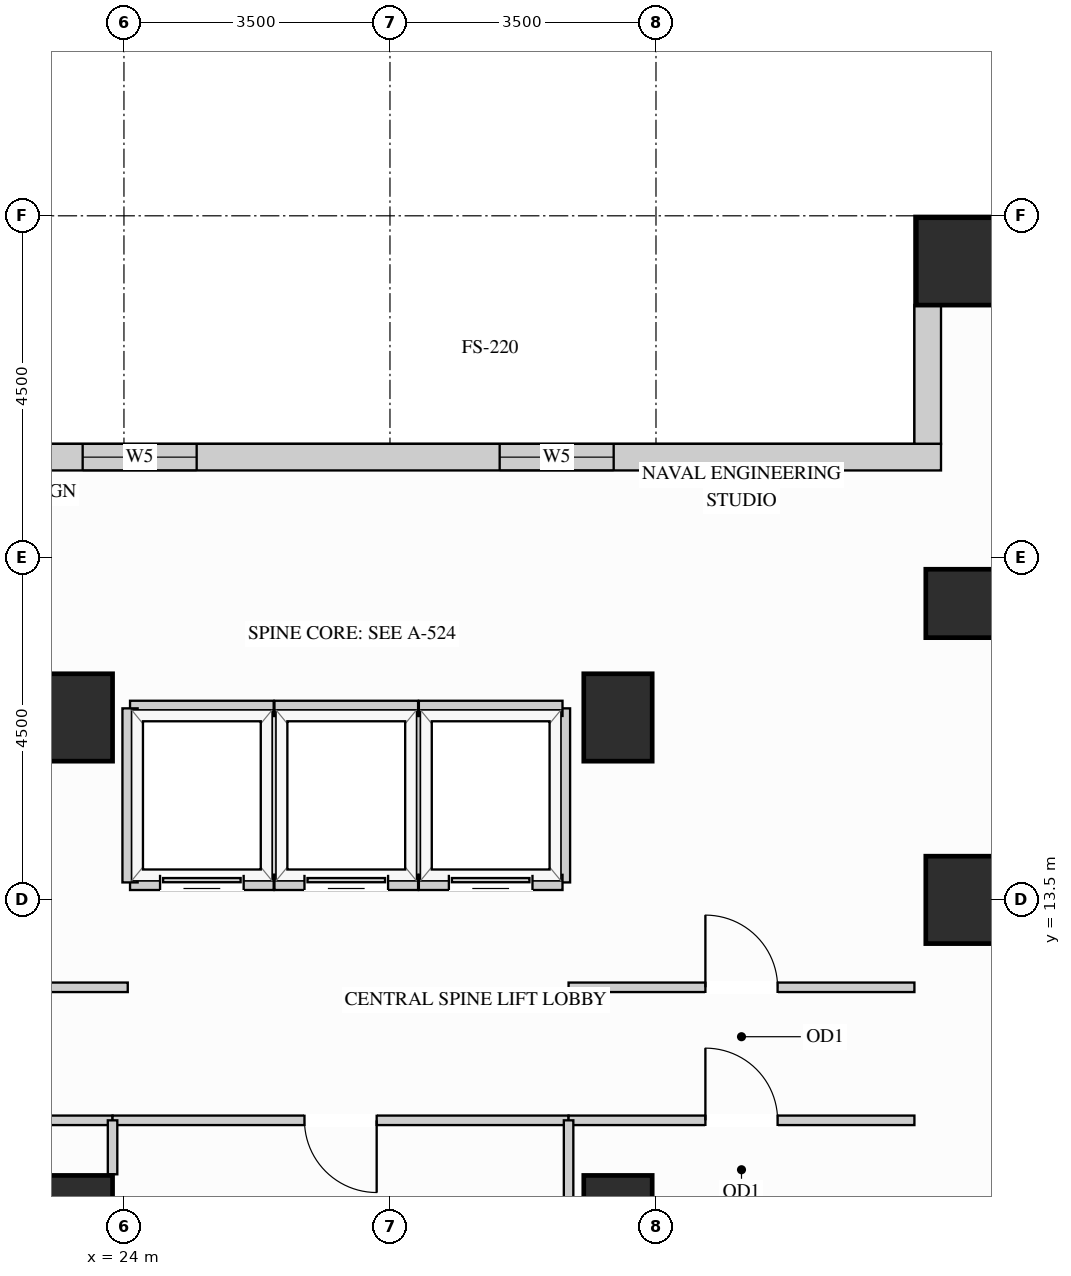
"""IFC4 building model, lengths in metres.
Left out: names, types, materials, properties, quantities, classifications, styles, units other than length and angle.
Written with IfcOpenShell. Run it as: python <this file> out.ifc"""

import sys

from ifc_helpers import new_model, si_unit, direction, frame, frame_2d, origin, origin_2d, place, context, subcontext, project, spatial, rectangle, extrude, source, transform, mapped, element, fill, save


model = new_model("IFC4")
c1 = context("Model", 3, precision=1e-05, world=origin(), true_north=direction((0.0, 1.0)))
c2 = subcontext(c1, "Body", "Model", "MODEL_VIEW")
j1 = project(units=[si_unit("LENGTHUNIT", "METRE"), si_unit("PLANEANGLEUNIT", "RADIAN")], contexts=[c1])
p1 = place(None, origin())
s1 = spatial("IfcSite", under=j1, at=p1, CompositionType="ELEMENT")
p2 = place(p1, origin())
s2 = spatial("IfcBuilding", under=s1, at=p2, CompositionType="ELEMENT")
p3 = place(p2, frame((0.0, 0.0, 135.0)))
s3 = spatial("IfcBuildingStorey", under=s2, at=p3, CompositionType="ELEMENT", Elevation=135.0)
m1 = source(origin(), c2, "Body", "SweptSolid", [
    extrude(rectangle(XDim=0.9, YDim=0.9, at=origin_2d()), origin(), (0.0, 0.0, 1.0), 3.32),
])
p4 = place(p3, frame((35.0, 17.4, 0.0), z_axis=(0.0, 0.0, 1.0), x_axis=(1.0, 0.0, 0.0)))
e1 = element("IfcColumn", 1, at=p4, inside=s3, PredefinedType="COLUMN", context=c2, shape_type="MappedRepresentation", body=[
    mapped(m1, transform((0.0, 0.0, 0.0), x_axis=(1.0, 0.0, 0.0), y_axis=(0.0, 1.0, 0.0), z_axis=(0.0, 0.0, 1.0))),
])
m2 = source(origin(), c2, "Body", "SweptSolid", [
    extrude(rectangle(XDim=0.9, YDim=1.15, at=origin_2d()), origin(), (0.0, 0.0, 1.0), 3.32),
])
for number, where, z_axis, x_axis in (
    (2, (35.0, 13.5, 0.0), (0.0, 0.0, 1.0), (1.0, 0.0, 0.0)),
    (3, (23.4, 15.9, 0.0), (0.0, 0.0, 1.0), (1.0, 0.0, 0.0)),
    (4, (23.4, 9.3, 0.0), (0.0, 0.0, 1.0), (1.0, 0.0, 0.0)),
    (5, (30.5, 15.9, 0.0), (0.0, 0.0, 1.0), (1.0, 0.0, 0.0)),
    (6, (30.5, 9.3, 0.0), (0.0, 0.0, 1.0), (1.0, 0.0, 0.0)),
):
    element("IfcColumn", number, at=place(p3, frame(where, z_axis=z_axis, x_axis=x_axis)), inside=s3, PredefinedType="COLUMN", context=c2, shape_type="MappedRepresentation", body=[
        mapped(m2, transform((0.0, 0.0, 0.0), x_axis=(1.0, 0.0, 0.0), y_axis=(0.0, 1.0, 0.0), z_axis=(0.0, 0.0, 1.0))),
    ])
m3 = source(origin(), c2, "Body", "SweptSolid", [
    extrude(rectangle(XDim=1.15, YDim=1.15, at=origin_2d()), origin(), (0.0, 0.0, 1.0), 3.32),
])
p5 = place(p3, frame((35.0, 21.9, 0.0), z_axis=(0.0, 0.0, 1.0), x_axis=(1.0, 0.0, 0.0)))
e7 = element("IfcColumn", 7, at=p5, inside=s3, PredefinedType="COLUMN", context=c2, shape_type="MappedRepresentation", body=[
    mapped(m3, transform((0.0, 0.0, 0.0), x_axis=(1.0, 0.0, 0.0), y_axis=(0.0, 1.0, 0.0), z_axis=(0.0, 0.0, 1.0))),
])
m4 = source(origin(), c2, "Body", "SweptSolid", [
    extrude(rectangle(XDim=1.829, YDim=0.35, at=frame_2d((0.915, 0.0))), origin(), (0.0, 0.0, 1.0), 3.305),
])
p6 = place(p3, frame((34.575, 21.327, 0.0), z_axis=(0.0, 0.0, 1.0), x_axis=(0.0, -1.0, 0.0)))
e8 = element("IfcWall", 8, at=p6, inside=s3, PredefinedType="SOLIDWALL", context=c2, shape_type="MappedRepresentation", body=[
    mapped(m4, transform((0.0, 0.0, 0.0), x_axis=(1.0, 0.0, 0.0), y_axis=(0.0, 1.0, 0.0), z_axis=(0.0, 0.0, 1.0))),
])
p7 = place(p3, frame((34.75, 19.325, 0.0), z_axis=(0.0, 0.0, 1.0), x_axis=(-1.0, 0.0, 0.0)))
e9 = element("IfcWall", 9, at=p7, inside=s3, PredefinedType="SOLIDWALL", context=c2, shape_type="SweptSolid", body=[
    extrude(rectangle(XDim=15.6, YDim=0.35, at=frame_2d((7.8, 0.0))), origin(), (0.0, 0.0, 1.0), 3.305),
])
p8 = place(p7, frame((4.307, 0.0, 0.78)))
e10 = element("IfcOpeningElement", 10, at=p8, cuts=e9, PredefinedType="OPENING", context=c2, shape_type="SweptSolid", body=[
    extrude(rectangle(XDim=1.5, YDim=2.0, at=frame_2d((0.75, 1.0))), frame((0.0, 0.185, 0.0), z_axis=(0.0, -1.0, 0.0), x_axis=(1.0, 0.0, 0.0)), (0.0, 0.0, 1.0), 0.37),
])
p9 = place(p7, frame((9.793, 0.0, 0.78)))
e11 = element("IfcOpeningElement", 11, at=p9, cuts=e9, PredefinedType="OPENING", context=c2, shape_type="SweptSolid", body=[
    extrude(rectangle(XDim=1.5, YDim=2.0, at=frame_2d((0.75, 1.0))), frame((0.0, 0.185, 0.0), z_axis=(0.0, -1.0, 0.0), x_axis=(1.0, 0.0, 0.0)), (0.0, 0.0, 1.0), 0.37),
])
p10 = place(p3, frame((29.85, 12.35, 0.0), z_axis=(0.0, 0.0, 1.0), x_axis=(1.0, 0.0, 0.0)))
e12 = element("IfcWall", 12, at=p10, inside=s3, PredefinedType="PARTITIONING", context=c2, shape_type="SweptSolid", body=[
    extrude(rectangle(XDim=4.55, YDim=0.125, at=frame_2d((2.275, 0.0))), origin(), (0.0, 0.0, 1.0), 3.305),
])
p11 = place(p10, frame((1.8, 0.0, 0.0)))
e13 = element("IfcOpeningElement", 13, at=p11, cuts=e12, PredefinedType="OPENING", context=c2, shape_type="SweptSolid", body=[
    extrude(rectangle(XDim=0.95, YDim=2.15, at=frame_2d((0.475, 1.075))), frame((0.0, 0.073, 0.0), z_axis=(0.0, -1.0, 0.0), x_axis=(1.0, 0.0, 0.0)), (0.0, 0.0, 1.0), 0.145),
])
p12 = place(p3, frame((19.5, 12.35, 0.0), z_axis=(0.0, 0.0, 1.0), x_axis=(1.0, 0.0, 0.0)))
e14 = element("IfcWall", 14, at=p12, inside=s3, PredefinedType="PARTITIONING", context=c2, shape_type="SweptSolid", body=[
    extrude(rectangle(XDim=4.55, YDim=0.125, at=frame_2d((2.275, 0.0))), origin(), (0.0, 0.0, 1.0), 3.305),
])
p13 = place(p12, frame((1.8, 0.0, 0.0)))
e15 = element("IfcOpeningElement", 15, at=p13, cuts=e14, PredefinedType="OPENING", context=c2, shape_type="SweptSolid", body=[
    extrude(rectangle(XDim=0.95, YDim=2.15, at=frame_2d((0.475, 1.075))), frame((0.0, 0.073, 0.0), z_axis=(0.0, -1.0, 0.0), x_axis=(1.0, 0.0, 0.0)), (0.0, 0.0, 1.0), 0.145),
])
p14 = place(p3, frame((19.5, 10.6, 0.0), z_axis=(0.0, 0.0, 1.0), x_axis=(1.0, 0.0, 0.0)))
e16 = element("IfcWall", 16, at=p14, inside=s3, PredefinedType="PARTITIONING", context=c2, shape_type="SweptSolid", body=[
    extrude(rectangle(XDim=4.35, YDim=0.125, at=frame_2d((2.175, 0.0))), origin(), (0.0, 0.0, 1.0), 3.305),
])
p15 = place(p14, frame((1.7, 0.0, 0.0)))
e17 = element("IfcOpeningElement", 17, at=p15, cuts=e16, PredefinedType="OPENING", context=c2, shape_type="SweptSolid", body=[
    extrude(rectangle(XDim=0.95, YDim=2.15, at=frame_2d((0.475, 1.075))), frame((0.0, 0.073, 0.0), z_axis=(0.0, -1.0, 0.0), x_axis=(1.0, 0.0, 0.0)), (0.0, 0.0, 1.0), 0.145),
])
p16 = place(p3, frame((23.85, 10.6, 0.0), z_axis=(0.0, 0.0, 1.0), x_axis=(1.0, 0.0, 0.0)))
e18 = element("IfcWall", 18, at=p16, inside=s3, PredefinedType="PARTITIONING", context=c2, shape_type="SweptSolid", body=[
    extrude(rectangle(XDim=6.0, YDim=0.125, at=frame_2d((3.0, 0.0))), origin(), (0.0, 0.0, 1.0), 3.305),
])
p17 = place(p16, frame((2.525, 0.0, 0.0)))
e19 = element("IfcOpeningElement", 19, at=p17, cuts=e18, PredefinedType="OPENING", context=c2, shape_type="SweptSolid", body=[
    extrude(rectangle(XDim=0.95, YDim=2.15, at=frame_2d((0.475, 1.075))), frame((0.0, 0.073, 0.0), z_axis=(0.0, -1.0, 0.0), x_axis=(1.0, 0.0, 0.0)), (0.0, 0.0, 1.0), 0.145),
])
p18 = place(p3, frame((29.85, 10.6, 0.0), z_axis=(0.0, 0.0, 1.0), x_axis=(1.0, 0.0, 0.0)))
e20 = element("IfcWall", 20, at=p18, inside=s3, PredefinedType="PARTITIONING", context=c2, shape_type="SweptSolid", body=[
    extrude(rectangle(XDim=4.55, YDim=0.125, at=frame_2d((2.275, 0.0))), origin(), (0.0, 0.0, 1.0), 3.305),
])
p19 = place(p18, frame((1.8, 0.0, 0.0)))
e21 = element("IfcOpeningElement", 21, at=p19, cuts=e20, PredefinedType="OPENING", context=c2, shape_type="SweptSolid", body=[
    extrude(rectangle(XDim=0.95, YDim=2.15, at=frame_2d((0.475, 1.075))), frame((0.0, 0.073, 0.0), z_axis=(0.0, -1.0, 0.0), x_axis=(1.0, 0.0, 0.0)), (0.0, 0.0, 1.0), 0.145),
])
m5 = source(origin(), c2, "Body", "SweptSolid", [
    extrude(rectangle(XDim=0.71, YDim=0.125, at=frame_2d((0.355, 0.0))), origin(), (0.0, 0.0, 1.0), 3.305),
])
p20 = place(p3, frame((23.85, 9.89, 0.0), z_axis=(0.0, 0.0, 1.0), x_axis=(0.0, 1.0, 0.0)))
e22 = element("IfcWall", 22, at=p20, inside=s3, PredefinedType="PARTITIONING", context=c2, shape_type="MappedRepresentation", body=[
    mapped(m5, transform((0.0, 0.0, 0.0), x_axis=(1.0, 0.0, 0.0), y_axis=(0.0, 1.0, 0.0), z_axis=(0.0, 0.0, 1.0))),
])
m6 = source(origin(), c2, "Body", "SweptSolid", [
    extrude(rectangle(XDim=1.748, YDim=0.125, at=frame_2d((0.874, 0.0))), origin(), (0.0, 0.0, 1.0), 3.305),
])
p21 = place(p3, frame((29.85, 8.852, 0.0), z_axis=(0.0, 0.0, 1.0), x_axis=(0.0, 1.0, 0.0)))
e23 = element("IfcWall", 23, at=p21, inside=s3, PredefinedType="PARTITIONING", context=c2, shape_type="MappedRepresentation", body=[
    mapped(m6, transform((0.0, 0.0, 0.0), x_axis=(1.0, 0.0, 0.0), y_axis=(0.0, 1.0, 0.0), z_axis=(0.0, 0.0, 1.0))),
])
m7 = source(origin(), c2, "Body", "SweptSolid", [
    extrude(rectangle(XDim=2.29, YDim=0.2, at=frame_2d((1.145, 0.0))), origin(), (0.0, 0.0, 1.0), 3.305),
])
p22 = place(p3, frame((25.97, 13.73, 0.0), z_axis=(0.0, 0.0, 1.0), x_axis=(0.0, 1.0, 0.0)))
e24 = element("IfcWall", 24, at=p22, inside=s3, PredefinedType="PARTITIONING", context=c2, shape_type="MappedRepresentation", body=[
    mapped(m7, transform((0.0, 0.0, 0.0), x_axis=(1.0, 0.0, 0.0), y_axis=(0.0, 1.0, 0.0), z_axis=(0.0, 0.0, 1.0))),
])
m8 = source(origin(), c2, "Body", "SweptSolid", [
    extrude(rectangle(XDim=1.89, YDim=0.2, at=frame_2d((0.945, 0.0))), origin(), (0.0, 0.0, 1.0), 2.617),
])
p23 = place(p3, frame((24.08, 16.02, 0.0), z_axis=(0.0, 0.0, 1.0), x_axis=(1.0, 0.0, 0.0)))
e25 = element("IfcWall", 25, at=p23, inside=s3, PredefinedType="PARTITIONING", context=c2, shape_type="MappedRepresentation", body=[
    mapped(m8, transform((0.0, 0.0, 0.0), x_axis=(1.0, 0.0, 0.0), y_axis=(0.0, 1.0, 0.0), z_axis=(0.0, 0.0, 1.0))),
])
p24 = place(p3, frame((24.08, 13.73, 0.0), z_axis=(0.0, 0.0, 1.0), x_axis=(1.0, 0.0, 0.0)))
e26 = element("IfcWall", 26, at=p24, inside=s3, PredefinedType="PARTITIONING", context=c2, shape_type="SweptSolid", body=[
    extrude(rectangle(XDim=1.89, YDim=0.2, at=frame_2d((0.945, 0.0))), origin(), (0.0, 0.0, 1.0), 2.386),
])
p25 = place(p24, frame((0.395, 0.0, 0.0)))
e27 = element("IfcOpeningElement", 27, at=p25, cuts=e26, PredefinedType="OPENING", context=c2, shape_type="SweptSolid", body=[
    extrude(rectangle(XDim=1.1, YDim=2.2, at=frame_2d((0.55, 1.1))), frame((0.0, 0.11, 0.0), z_axis=(0.0, -1.0, 0.0), x_axis=(1.0, 0.0, 0.0)), (0.0, 0.0, 1.0), 0.22),
])
for number, where, z_axis, x_axis in (
    (28, (24.08, 13.73, 0.0), (0.0, 0.0, 1.0), (0.0, 1.0, 0.0)),
    (29, (27.87, 13.73, 0.0), (0.0, 0.0, 1.0), (0.0, 1.0, 0.0)),
):
    element("IfcWall", number, at=place(p3, frame(where, z_axis=z_axis, x_axis=x_axis)), inside=s3, PredefinedType="PARTITIONING", context=c2, shape_type="MappedRepresentation", body=[
        mapped(m7, transform((0.0, 0.0, 0.0), x_axis=(1.0, 0.0, 0.0), y_axis=(0.0, 1.0, 0.0), z_axis=(0.0, 0.0, 1.0))),
    ])
m9 = source(origin(), c2, "Body", "SweptSolid", [
    extrude(rectangle(XDim=1.89, YDim=0.2, at=frame_2d((0.945, 0.0))), origin(), (0.0, 0.0, 1.0), 2.617),
])
p26 = place(p3, frame((25.98, 16.02, 0.0), z_axis=(0.0, 0.0, 1.0), x_axis=(1.0, 0.0, 0.0)))
e30 = element("IfcWall", 30, at=p26, inside=s3, PredefinedType="PARTITIONING", context=c2, shape_type="MappedRepresentation", body=[
    mapped(m9, transform((0.0, 0.0, 0.0), x_axis=(1.0, 0.0, 0.0), y_axis=(0.0, 1.0, 0.0), z_axis=(0.0, 0.0, 1.0))),
])
p27 = place(p3, frame((25.98, 13.73, 0.0), z_axis=(0.0, 0.0, 1.0), x_axis=(1.0, 0.0, 0.0)))
e31 = element("IfcWall", 31, at=p27, inside=s3, PredefinedType="PARTITIONING", context=c2, shape_type="SweptSolid", body=[
    extrude(rectangle(XDim=1.89, YDim=0.2, at=frame_2d((0.945, 0.0))), origin(), (0.0, 0.0, 1.0), 2.386),
])
p28 = place(p27, frame((0.395, 0.0, 0.0)))
e32 = element("IfcOpeningElement", 32, at=p28, cuts=e31, PredefinedType="OPENING", context=c2, shape_type="SweptSolid", body=[
    extrude(rectangle(XDim=1.1, YDim=2.2, at=frame_2d((0.55, 1.1))), frame((0.0, 0.11, 0.0), z_axis=(0.0, -1.0, 0.0), x_axis=(1.0, 0.0, 0.0)), (0.0, 0.0, 1.0), 0.22),
])
p29 = place(p3, frame((29.77, 13.73, 0.0), z_axis=(0.0, 0.0, 1.0), x_axis=(0.0, 1.0, 0.0)))
e33 = element("IfcWall", 33, at=p29, inside=s3, PredefinedType="PARTITIONING", context=c2, shape_type="MappedRepresentation", body=[
    mapped(m7, transform((0.0, 0.0, 0.0), x_axis=(1.0, 0.0, 0.0), y_axis=(0.0, 1.0, 0.0), z_axis=(0.0, 0.0, 1.0))),
])
p30 = place(p3, frame((27.88, 16.02, 0.0), z_axis=(0.0, 0.0, 1.0), x_axis=(1.0, 0.0, 0.0)))
e34 = element("IfcWall", 34, at=p30, inside=s3, PredefinedType="PARTITIONING", context=c2, shape_type="MappedRepresentation", body=[
    mapped(m9, transform((0.0, 0.0, 0.0), x_axis=(1.0, 0.0, 0.0), y_axis=(0.0, 1.0, 0.0), z_axis=(0.0, 0.0, 1.0))),
])
p31 = place(p3, frame((27.88, 13.73, 0.0), z_axis=(0.0, 0.0, 1.0), x_axis=(1.0, 0.0, 0.0)))
e35 = element("IfcWall", 35, at=p31, inside=s3, PredefinedType="PARTITIONING", context=c2, shape_type="SweptSolid", body=[
    extrude(rectangle(XDim=1.89, YDim=0.2, at=frame_2d((0.945, 0.0))), origin(), (0.0, 0.0, 1.0), 2.386),
])
p32 = place(p31, frame((0.395, 0.0, 0.0)))
e36 = element("IfcOpeningElement", 36, at=p32, cuts=e35, PredefinedType="OPENING", context=c2, shape_type="SweptSolid", body=[
    extrude(rectangle(XDim=1.1, YDim=2.2, at=frame_2d((0.55, 1.1))), frame((0.0, 0.11, 0.0), z_axis=(0.0, -1.0, 0.0), x_axis=(1.0, 0.0, 0.0)), (0.0, 0.0, 1.0), 0.22),
])
m10 = source(origin(), c2, "Body", "SweptSolid", [
    extrude(rectangle(XDim=1.1, YDim=2.2, at=frame_2d((0.55, 1.1))), frame((0.0, 0.025, 0.0), z_axis=(0.0, -1.0, 0.0), x_axis=(1.0, 0.0, 0.0)), (0.0, 0.0, 1.0), 0.05),
])
p33 = place(p25, origin())
e37 = element("IfcDoor", 37, at=p33, inside=s3, OperationType="SLIDING_TO_LEFT", PredefinedType="DOOR", context=c2, shape_type="MappedRepresentation", body=[
    mapped(m10, transform((0.0, 0.0, 0.0), x_axis=(1.0, 0.0, 0.0), y_axis=(0.0, 1.0, 0.0), z_axis=(0.0, 0.0, 1.0))),
])
fill(e27, e37)
p34 = place(p28, origin())
e38 = element("IfcDoor", 38, at=p34, inside=s3, OperationType="SLIDING_TO_LEFT", PredefinedType="DOOR", context=c2, shape_type="MappedRepresentation", body=[
    mapped(m10, transform((0.0, 0.0, 0.0), x_axis=(1.0, 0.0, 0.0), y_axis=(0.0, 1.0, 0.0), z_axis=(0.0, 0.0, 1.0))),
])
fill(e32, e38)
p35 = place(p32, origin())
e39 = element("IfcDoor", 39, at=p35, inside=s3, OperationType="SLIDING_TO_LEFT", PredefinedType="DOOR", context=c2, shape_type="MappedRepresentation", body=[
    mapped(m10, transform((0.0, 0.0, 0.0), x_axis=(1.0, 0.0, 0.0), y_axis=(0.0, 1.0, 0.0), z_axis=(0.0, 0.0, 1.0))),
])
fill(e36, e39)
m11 = source(origin(), c2, "Body", "SweptSolid", [
    extrude(rectangle(XDim=0.95, YDim=2.15, at=frame_2d((0.475, 1.075))), frame((0.0, 0.025, 0.0), z_axis=(0.0, -1.0, 0.0), x_axis=(1.0, 0.0, 0.0)), (0.0, 0.0, 1.0), 0.05),
])
p36 = place(p11, origin())
e40 = element("IfcDoor", 40, at=p36, inside=s3, OperationType="SINGLE_SWING_LEFT", PredefinedType="DOOR", context=c2, shape_type="MappedRepresentation", body=[
    mapped(m11, transform((0.0, 0.0, 0.0), x_axis=(1.0, 0.0, 0.0), y_axis=(0.0, 1.0, 0.0), z_axis=(0.0, 0.0, 1.0))),
])
fill(e13, e40)
p37 = place(p17, origin())
e41 = element("IfcDoor", 41, at=p37, inside=s3, OperationType="SINGLE_SWING_RIGHT", PredefinedType="DOOR", context=c2, shape_type="MappedRepresentation", body=[
    mapped(m11, transform((0.0, 0.0, 0.0), x_axis=(1.0, 0.0, 0.0), y_axis=(0.0, 1.0, 0.0), z_axis=(0.0, 0.0, 1.0))),
])
fill(e19, e41)
p38 = place(p19, origin())
e42 = element("IfcDoor", 42, at=p38, inside=s3, OperationType="SINGLE_SWING_LEFT", PredefinedType="DOOR", context=c2, shape_type="MappedRepresentation", body=[
    mapped(m11, transform((0.0, 0.0, 0.0), x_axis=(1.0, 0.0, 0.0), y_axis=(0.0, 1.0, 0.0), z_axis=(0.0, 0.0, 1.0))),
])
fill(e21, e42)
m12 = source(origin(), c2, "Body", "SweptSolid", [
    extrude(rectangle(XDim=1.5, YDim=2.0, at=frame_2d((0.75, 1.0))), frame((0.0, 0.03, 0.0), z_axis=(0.0, -1.0, 0.0), x_axis=(1.0, 0.0, 0.0)), (0.0, 0.0, 1.0), 0.06),
])
p39 = place(p8, origin())
e43 = element("IfcWindow", 43, at=p39, inside=s3, PartitioningType="SINGLE_PANEL", PredefinedType="WINDOW", context=c2, shape_type="MappedRepresentation", body=[
    mapped(m12, transform((0.0, 0.0, 0.0), x_axis=(1.0, 0.0, 0.0), y_axis=(0.0, 1.0, 0.0), z_axis=(0.0, 0.0, 1.0))),
])
fill(e10, e43)
p40 = place(p9, origin())
e44 = element("IfcWindow", 44, at=p40, inside=s3, PartitioningType="SINGLE_PANEL", PredefinedType="WINDOW", context=c2, shape_type="MappedRepresentation", body=[
    mapped(m12, transform((0.0, 0.0, 0.0), x_axis=(1.0, 0.0, 0.0), y_axis=(0.0, 1.0, 0.0), z_axis=(0.0, 0.0, 1.0))),
])
fill(e11, e44)
save(model, sys.argv[1])
